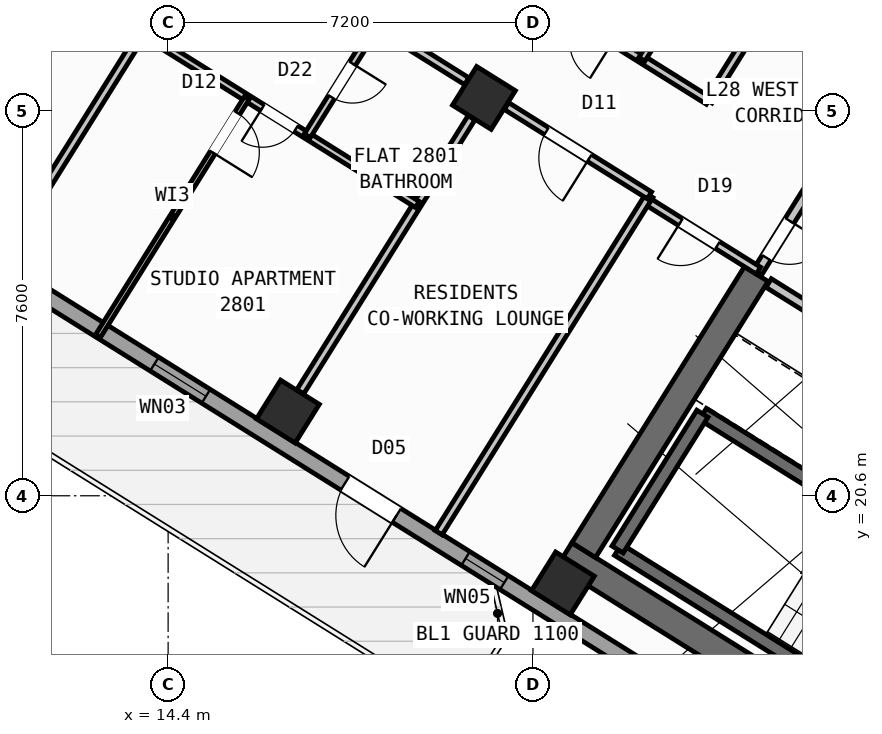
"""IFC4 building model, lengths in metres.
Left out: names, types, materials, properties, quantities, classifications, styles, units other than length and angle.
Written with IfcOpenShell. Run it as: python <this file> out.ifc"""

import sys

from ifc_helpers import new_model, si_unit, direction, frame, frame_2d, origin, origin_2d, place, context, subcontext, project, spatial, rectangle, hollow_rectangle, extrude, source, transform, mapped, element, fill, save


model = new_model("IFC4")
c1 = context("Model", 3, precision=1e-05, world=origin(), true_north=direction((0.0, 1.0)))
c2 = subcontext(c1, "Body", "Model", "MODEL_VIEW")
j1 = project(units=[si_unit("LENGTHUNIT", "METRE"), si_unit("PLANEANGLEUNIT", "RADIAN")], contexts=[c1])
p1 = place(None, origin())
s1 = spatial("IfcSite", under=j1, at=p1, CompositionType="ELEMENT")
p2 = place(p1, origin())
s2 = spatial("IfcBuilding", under=s1, at=p2, CompositionType="ELEMENT")
p3 = place(p2, frame((0.0, 0.0, 112.5)))
s3 = spatial("IfcBuildingStorey", under=s2, at=p3, CompositionType="ELEMENT", Elevation=112.5)
p4 = place(p3, frame((33.366, 12.477, 0.0), z_axis=(0.0, 0.0, 1.0), x_axis=(-0.848047359947, 0.529920442413, 0.0)))
e1 = element("IfcWall", 1, at=p4, inside=s3, PredefinedType="SHEAR", context=c2, shape_type="SweptSolid", body=[
    extrude(rectangle(XDim=13.14, YDim=0.55, at=frame_2d((6.57, 0.0))), origin(), (0.0, 0.0, 1.0), 3.35),
])
p5 = place(p3, frame((26.007, 24.976, 0.0), z_axis=(0.0, 0.0, 1.0), x_axis=(-0.529923795287, -0.848045264823, 0.0)))
e2 = element("IfcWall", 2, at=p5, inside=s3, PredefinedType="SHEAR", context=c2, shape_type="SweptSolid", body=[
    extrude(rectangle(XDim=6.425, YDim=0.55, at=frame_2d((3.212, 0.0))), origin(), (0.0, 0.0, 1.0), 3.35),
])
m1 = source(origin(), c2, "Body", "SweptSolid", [
    extrude(hollow_rectangle(XDim=0.9, YDim=0.9, WallThickness=0.036, at=origin_2d()), origin(), (0.0, 0.0, 1.0), 3.6),
])
for number, where, z_axis, x_axis in (
    (3, (22.191, 18.87, 0.0), (0.0, 0.0, 1.0), (-0.848, 0.53, 0.0)),
    (4, (20.632, 28.452, 0.0), (0.0, 0.0, 1.0), (-0.848, 0.53, 0.0)),
    (5, (16.764, 22.261, 0.0), (0.0, 0.0, 1.0), (-0.848, 0.53, 0.0)),
):
    element("IfcColumn", number, at=place(p3, frame(where, z_axis=z_axis, x_axis=x_axis)), inside=s3, PredefinedType="COLUMN", context=c2, shape_type="MappedRepresentation", body=[
        mapped(m1, transform((0.0, 0.0, 0.0), scale=1.0)),
    ])
p6 = place(p3, frame((31.76, 12.183, 0.0), z_axis=(0.0, 0.0, 1.0), x_axis=(-0.848047074256, 0.529920899612, 0.0)))
e6 = element("IfcWall", 6, at=p6, inside=s3, PredefinedType="STANDARD", context=c2, shape_type="SweptSolid", body=[
    extrude(rectangle(XDim=30.652, YDim=0.32, at=frame_2d((15.326, 0.0))), origin(), (0.0, 0.0, 1.0), 3.35),
])
p7 = place(p6, frame((15.153, 0.0, 0.0)))
e7 = element("IfcOpeningElement", 7, at=p7, cuts=e6, PredefinedType="OPENING", context=c2, shape_type="SweptSolid", body=[
    extrude(rectangle(XDim=1.2, YDim=2.15, at=frame_2d((0.6, 1.075))), frame((0.0, 0.17, 0.0), z_axis=(0.0, -1.0, 0.0), x_axis=(1.0, 0.0, 0.0)), (0.0, 0.0, 1.0), 0.34),
])
p8 = place(p6, frame((2.002, 0.0, 0.8)))
e8 = element("IfcOpeningElement", 8, at=p8, cuts=e6, PredefinedType="OPENING", context=c2, shape_type="SweptSolid", body=[
    extrude(rectangle(XDim=2.1, YDim=1.55, at=frame_2d((1.05, 0.775))), frame((0.0, 0.17, 0.0), z_axis=(0.0, -1.0, 0.0), x_axis=(1.0, 0.0, 0.0)), (0.0, 0.0, 1.0), 0.34),
])
p9 = place(p6, frame((7.206, 0.0, 0.8)))
e9 = element("IfcOpeningElement", 9, at=p9, cuts=e6, PredefinedType="OPENING", context=c2, shape_type="SweptSolid", body=[
    extrude(rectangle(XDim=2.1, YDim=1.55, at=frame_2d((1.05, 0.775))), frame((0.0, 0.17, 0.0), z_axis=(0.0, -1.0, 0.0), x_axis=(1.0, 0.0, 0.0)), (0.0, 0.0, 1.0), 0.34),
])
p10 = place(p6, frame((12.648, 0.0, 1.0)))
e10 = element("IfcOpeningElement", 10, at=p10, cuts=e6, PredefinedType="OPENING", context=c2, shape_type="SweptSolid", body=[
    extrude(rectangle(XDim=0.9, YDim=1.25, at=frame_2d((0.45, 0.625))), frame((0.0, 0.17, 0.0), z_axis=(0.0, -1.0, 0.0), x_axis=(1.0, 0.0, 0.0)), (0.0, 0.0, 1.0), 0.34),
])
p11 = place(p6, frame((19.59, 0.0, 0.95)))
e11 = element("IfcOpeningElement", 11, at=p11, cuts=e6, PredefinedType="OPENING", context=c2, shape_type="SweptSolid", body=[
    extrude(rectangle(XDim=1.2, YDim=1.4, at=frame_2d((0.6, 0.7))), frame((0.0, 0.17, 0.0), z_axis=(0.0, -1.0, 0.0), x_axis=(1.0, 0.0, 0.0)), (0.0, 0.0, 1.0), 0.34),
])
p12 = place(p6, frame((25.966, 0.0, 1.0)))
e12 = element("IfcOpeningElement", 12, at=p12, cuts=e6, PredefinedType="OPENING", context=c2, shape_type="SweptSolid", body=[
    extrude(rectangle(XDim=0.9, YDim=1.25, at=frame_2d((0.45, 0.625))), frame((0.0, 0.17, 0.0), z_axis=(0.0, -1.0, 0.0), x_axis=(1.0, 0.0, 0.0)), (0.0, 0.0, 1.0), 0.34),
])
p13 = place(p6, frame((28.871, 0.0, 1.0)))
e13 = element("IfcOpeningElement", 13, at=p13, cuts=e6, PredefinedType="OPENING", context=c2, shape_type="SweptSolid", body=[
    extrude(rectangle(XDim=0.9, YDim=1.25, at=frame_2d((0.45, 0.625))), frame((0.0, 0.17, 0.0), z_axis=(0.0, -1.0, 0.0), x_axis=(1.0, 0.0, 0.0)), (0.0, 0.0, 1.0), 0.34),
])
p14 = place(p3, frame((5.7, 28.71, 0.0), z_axis=(0.0, 0.0, 1.0), x_axis=(0.529923711467, 0.8480453172, 0.0)))
e14 = element("IfcWall", 14, at=p14, inside=s3, PredefinedType="STANDARD", context=c2, shape_type="SweptSolid", body=[
    extrude(rectangle(XDim=21.587, YDim=0.32, at=frame_2d((10.794, 0.0))), origin(), (0.0, 0.0, 1.0), 2.775),
])
p15 = place(p14, frame((1.984, 0.0, 0.8)))
e15 = element("IfcOpeningElement", 15, at=p15, cuts=e14, PredefinedType="OPENING", context=c2, shape_type="SweptSolid", body=[
    extrude(rectangle(XDim=2.1, YDim=1.55, at=frame_2d((1.05, 0.775))), frame((0.0, 0.17, 0.0), z_axis=(0.0, -1.0, 0.0), x_axis=(1.0, 0.0, 0.0)), (0.0, 0.0, 1.0), 0.34),
])
p16 = place(p14, frame((11.459, 0.0, 0.85)))
e16 = element("IfcOpeningElement", 16, at=p16, cuts=e14, PredefinedType="OPENING", context=c2, shape_type="SweptSolid", body=[
    extrude(rectangle(XDim=1.8, YDim=1.5, at=frame_2d((0.9, 0.75))), frame((0.0, 0.17, 0.0), z_axis=(0.0, -1.0, 0.0), x_axis=(1.0, 0.0, 0.0)), (0.0, 0.0, 1.0), 0.34),
])
p17 = place(p14, frame((18.335, 0.0, 0.85)))
e17 = element("IfcOpeningElement", 17, at=p17, cuts=e14, PredefinedType="OPENING", context=c2, shape_type="SweptSolid", body=[
    extrude(rectangle(XDim=1.5, YDim=1.5, at=frame_2d((0.75, 0.75))), frame((0.0, 0.17, 0.0), z_axis=(0.0, -1.0, 0.0), x_axis=(1.0, 0.0, 0.0)), (0.0, 0.0, 1.0), 0.34),
])
p18 = place(p3, frame((29.605, 15.581, 0.0), z_axis=(0.0, 0.0, 1.0), x_axis=(-0.848036911448, 0.529937163087, 0.0)))
e18 = element("IfcWall", 18, at=p18, inside=s3, PredefinedType="SHEAR", context=c2, shape_type="SweptSolid", body=[
    extrude(rectangle(XDim=7.46, YDim=0.26, at=frame_2d((3.73, 0.0))), origin(), (0.0, 0.0, 1.0), 3.35),
])
p19 = place(p3, frame((31.28, 18.261, 0.0), z_axis=(0.0, 0.0, 1.0), x_axis=(-0.848051618787, 0.529913626805, 0.0)))
e19 = element("IfcWall", 19, at=p19, inside=s3, PredefinedType="SHEAR", context=c2, shape_type="SweptSolid", body=[
    extrude(rectangle(XDim=7.46, YDim=0.26, at=frame_2d((3.73, 0.0))), origin(), (0.0, 0.0, 1.0), 3.35),
])
p20 = place(p19, frame((0.36, 0.0, 0.0)))
e20 = element("IfcOpeningElement", 20, at=p20, cuts=e19, PredefinedType="OPENING", context=c2, shape_type="SweptSolid", body=[
    extrude(rectangle(XDim=0.86, YDim=2.05, at=frame_2d((0.43, 1.025))), frame((0.0, 0.14, 0.0), z_axis=(0.0, -1.0, 0.0), x_axis=(1.0, 0.0, 0.0)), (0.0, 0.0, 1.0), 0.28),
])
p21 = place(p3, frame((24.945, 22.22, 0.0), z_axis=(0.0, 0.0, 1.0), x_axis=(-0.529908658664, -0.84805472316, 0.0)))
e21 = element("IfcWall", 21, at=p21, inside=s3, PredefinedType="SHEAR", context=c2, shape_type="SweptSolid", body=[
    extrude(rectangle(XDim=3.16, YDim=0.26, at=frame_2d((1.58, 0.0))), origin(), (0.0, 0.0, 1.0), 3.35),
])
p22 = place(p3, frame((31.525, 21.504, 0.0), z_axis=(0.0, 0.0, 1.0), x_axis=(-0.848040211232, 0.529931882541, 0.0)))
e22 = element("IfcWall", 22, at=p22, inside=s3, PredefinedType="STANDARD", context=c2, shape_type="SweptSolid", body=[
    extrude(rectangle(XDim=6.218, YDim=0.2, at=frame_2d((3.109, 0.0))), origin(), (0.0, 0.0, 1.0), 3.34),
])
p23 = place(p22, frame((4.4, 0.0, 0.0)))
e23 = element("IfcOpeningElement", 23, at=p23, cuts=e22, PredefinedType="OPENING", context=c2, shape_type="SweptSolid", body=[
    extrude(rectangle(XDim=0.86, YDim=2.05, at=frame_2d((0.43, 1.025))), frame((0.0, 0.11, 0.0), z_axis=(0.0, -1.0, 0.0), x_axis=(1.0, 0.0, 0.0)), (0.0, 0.0, 1.0), 0.22),
])
p24 = place(p22, frame((0.35, 0.0, 0.0)))
e24 = element("IfcOpeningElement", 24, at=p24, cuts=e22, PredefinedType="OPENING", context=c2, shape_type="SweptSolid", body=[
    extrude(rectangle(XDim=0.86, YDim=2.05, at=frame_2d((0.43, 1.025))), frame((0.0, 0.11, 0.0), z_axis=(0.0, -1.0, 0.0), x_axis=(1.0, 0.0, 0.0)), (0.0, 0.0, 1.0), 0.22),
])
p25 = place(p3, frame((27.596, 27.52, 0.0), z_axis=(0.0, 0.0, 1.0), x_axis=(-0.529865479138, -0.848081702443, 0.0)))
e25 = element("IfcWall", 25, at=p25, inside=s3, PredefinedType="STANDARD", context=c2, shape_type="SweptSolid", body=[
    extrude(rectangle(XDim=2.96, YDim=0.2, at=frame_2d((1.48, 0.0))), origin(), (0.0, 0.0, 1.0), 3.34),
])
p26 = place(p25, frame((1.76, 0.0, 0.0)))
e26 = element("IfcOpeningElement", 26, at=p26, cuts=e25, PredefinedType="OPENING", context=c2, shape_type="SweptSolid", body=[
    extrude(rectangle(XDim=0.86, YDim=2.05, at=frame_2d((0.43, 1.025))), frame((0.0, 0.11, 0.0), z_axis=(0.0, -1.0, 0.0), x_axis=(1.0, 0.0, 0.0)), (0.0, 0.0, 1.0), 0.22),
])
p27 = place(p3, frame((26.049, 25.044, 0.0), z_axis=(0.0, 0.0, 1.0), x_axis=(-0.848050851465, 0.529914854792, 0.0)))
e27 = element("IfcWall", 27, at=p27, inside=s3, PredefinedType="PARTITIONING", context=c2, shape_type="SweptSolid", body=[
    extrude(rectangle(XDim=2.61, YDim=0.16, at=frame_2d((1.305, 0.0))), origin(), (0.0, 0.0, 1.0), 2.775),
])
p28 = place(p27, frame((0.95, 0.0, 0.0)))
e28 = element("IfcOpeningElement", 28, at=p28, cuts=e27, PredefinedType="OPENING", context=c2, shape_type="SweptSolid", body=[
    extrude(rectangle(XDim=0.86, YDim=2.05, at=frame_2d((0.43, 1.025))), frame((0.0, 0.09, 0.0), z_axis=(0.0, -1.0, 0.0), x_axis=(1.0, 0.0, 0.0)), (0.0, 0.0, 1.0), 0.18),
])
p29 = place(p3, frame((31.239, 38.274, 0.0), z_axis=(0.0, 0.0, 1.0), x_axis=(-0.529925472745, -0.848044216616, 0.0)))
e29 = element("IfcWall", 29, at=p29, inside=s3, PredefinedType="PARTITIONING", context=c2, shape_type="SweptSolid", body=[
    extrude(rectangle(XDim=11.65, YDim=0.16, at=frame_2d((5.825, 0.0))), origin(), (0.0, 0.0, 1.0), 3.34),
])
p30 = place(p3, frame((23.899, 26.529, 0.0), z_axis=(0.0, 0.0, 1.0), x_axis=(-0.529920662441, -0.848047222457, 0.0)))
e30 = element("IfcWall", 30, at=p30, inside=s3, PredefinedType="PARTITIONING", context=c2, shape_type="SweptSolid", body=[
    extrude(rectangle(XDim=7.85, YDim=0.16, at=frame_2d((3.925, 0.0))), origin(), (0.0, 0.0, 1.0), 3.34),
])
p31 = place(p3, frame((25.065, 28.394, 0.0), z_axis=(0.0, 0.0, 1.0), x_axis=(-0.848048310262, 0.529918921593, 0.0)))
e31 = element("IfcWall", 31, at=p31, inside=s3, PredefinedType="PARTITIONING", context=c2, shape_type="SweptSolid", body=[
    extrude(rectangle(XDim=16.73, YDim=0.16, at=frame_2d((8.365, 0.0))), origin(), (0.0, 0.0, 1.0), 3.34),
])
p32 = place(p31, frame((2.22, 0.0, 0.0)))
e32 = element("IfcOpeningElement", 32, at=p32, cuts=e31, PredefinedType="OPENING", context=c2, shape_type="SweptSolid", body=[
    extrude(rectangle(XDim=0.86, YDim=2.05, at=frame_2d((0.43, 1.025))), frame((0.0, 0.09, 0.0), z_axis=(0.0, -1.0, 0.0), x_axis=(1.0, 0.0, 0.0)), (0.0, 0.0, 1.0), 0.18),
])
p33 = place(p31, frame((7.82, 0.0, 0.0)))
e33 = element("IfcOpeningElement", 33, at=p33, cuts=e31, PredefinedType="OPENING", context=c2, shape_type="SweptSolid", body=[
    extrude(rectangle(XDim=1.0, YDim=2.1, at=frame_2d((0.5, 1.05))), frame((0.0, 0.09, 0.0), z_axis=(0.0, -1.0, 0.0), x_axis=(1.0, 0.0, 0.0)), (0.0, 0.0, 1.0), 0.18),
])
p34 = place(p31, frame((12.95, 0.0, 0.0)))
e34 = element("IfcOpeningElement", 34, at=p34, cuts=e31, PredefinedType="OPENING", context=c2, shape_type="SweptSolid", body=[
    extrude(rectangle(XDim=1.0, YDim=2.1, at=frame_2d((0.5, 1.05))), frame((0.0, 0.09, 0.0), z_axis=(0.0, -1.0, 0.0), x_axis=(1.0, 0.0, 0.0)), (0.0, 0.0, 1.0), 0.18),
])
p35 = place(p3, frame((23.899, 26.529, 0.0), z_axis=(0.0, 0.0, 1.0), x_axis=(-0.848064240775, 0.529893426567, 0.0)))
e35 = element("IfcWall", 35, at=p35, inside=s3, PredefinedType="PARTITIONING", context=c2, shape_type="SweptSolid", body=[
    extrude(rectangle(XDim=3.328, YDim=0.16, at=frame_2d((1.664, 0.0))), origin(), (0.0, 0.0, 1.0), 2.775),
])
p36 = place(p35, frame((1.395, 0.0, 0.0)))
e36 = element("IfcOpeningElement", 36, at=p36, cuts=e35, PredefinedType="OPENING", context=c2, shape_type="SweptSolid", body=[
    extrude(rectangle(XDim=1.0, YDim=2.1, at=frame_2d((0.5, 1.05))), frame((0.0, 0.09, 0.0), z_axis=(0.0, -1.0, 0.0), x_axis=(1.0, 0.0, 0.0)), (0.0, 0.0, 1.0), 0.18),
])
p37 = place(p3, frame((20.293, 28.782, 0.0), z_axis=(0.0, 0.0, 1.0), x_axis=(-0.848040881926, 0.529930809241, 0.0)))
e37 = element("IfcWall", 37, at=p37, inside=s3, PredefinedType="PARTITIONING", context=c2, shape_type="SweptSolid", body=[
    extrude(rectangle(XDim=5.476, YDim=0.16, at=frame_2d((2.738, 0.0))), origin(), (0.0, 0.0, 1.0), 2.775),
])
p38 = place(p37, frame((3.568, 0.0, 0.0)))
e38 = element("IfcOpeningElement", 38, at=p38, cuts=e37, PredefinedType="OPENING", context=c2, shape_type="SweptSolid", body=[
    extrude(rectangle(XDim=1.0, YDim=2.1, at=frame_2d((0.5, 1.05))), frame((0.0, 0.09, 0.0), z_axis=(0.0, -1.0, 0.0), x_axis=(1.0, 0.0, 0.0)), (0.0, 0.0, 1.0), 0.18),
])
for number, where, z_axis, x_axis in (
    (39, (20.387, 28.06, 0.0), (0.0, 0.0, 1.0), (-0.53, -0.848, 0.0)),
    (40, (14.96, 31.452, 0.0), (0.0, 0.0, 1.0), (-0.53, -0.848, 0.0)),
):
    element("IfcWall", number, at=place(p3, frame(where, z_axis=z_axis, x_axis=x_axis)), inside=s3, PredefinedType="PARTITIONING", context=c2, shape_type="SweptSolid", body=[
        extrude(rectangle(XDim=6.376, YDim=0.16, at=frame_2d((3.188, 0.0))), origin(), (0.0, 0.0, 1.0), 2.775),
    ])
p39 = place(p3, frame((19.318, 26.349, 0.0), z_axis=(0.0, 0.0, 1.0), x_axis=(-0.848039019877, 0.529933789039, 0.0)))
e41 = element("IfcWall", 41, at=p39, inside=s3, PredefinedType="PLUMBINGWALL", context=c2, shape_type="SweptSolid", body=[
    extrude(rectangle(XDim=6.4, YDim=0.14, at=frame_2d((3.2, 0.0))), origin(), (0.0, 0.0, 1.0), 3.34),
])
p40 = place(p39, frame((2.824, 0.0, 0.0)))
e42 = element("IfcOpeningElement", 42, at=p40, cuts=e41, PredefinedType="OPENING", context=c2, shape_type="SweptSolid", body=[
    extrude(rectangle(XDim=0.78, YDim=2.05, at=frame_2d((0.39, 1.025))), frame((0.0, 0.08, 0.0), z_axis=(0.0, -1.0, 0.0), x_axis=(1.0, 0.0, 0.0)), (0.0, 0.0, 1.0), 0.16),
])
p41 = place(p3, frame((18.514, 29.894, 0.0), z_axis=(0.0, 0.0, 1.0), x_axis=(-0.529913878929, -0.848051461244, 0.0)))
e43 = element("IfcWall", 43, at=p41, inside=s3, PredefinedType="PLUMBINGWALL", context=c2, shape_type="SweptSolid", body=[
    extrude(rectangle(XDim=2.58, YDim=0.14, at=frame_2d((1.29, 0.0))), origin(), (0.0, 0.0, 1.0), 3.34),
])
p42 = place(p41, frame((0.9, 0.0, 0.0)))
e44 = element("IfcOpeningElement", 44, at=p42, cuts=e43, PredefinedType="OPENING", context=c2, shape_type="SweptSolid", body=[
    extrude(rectangle(XDim=0.78, YDim=2.05, at=frame_2d((0.39, 1.025))), frame((0.0, 0.08, 0.0), z_axis=(0.0, -1.0, 0.0), x_axis=(1.0, 0.0, 0.0)), (0.0, 0.0, 1.0), 0.16),
])
p43 = place(p3, frame((15.953, 28.452, 0.0), z_axis=(0.0, 0.0, 1.0), x_axis=(-0.529919714018, -0.848047815099, 0.0)))
e45 = element("IfcWall", 45, at=p43, inside=s3, PredefinedType="PARTITIONING", context=c2, shape_type="SweptSolid", body=[
    extrude(rectangle(XDim=5.54, YDim=0.11, at=frame_2d((2.77, 0.0))), origin(), (0.0, 0.0, 1.0), 3.34),
])
p44 = place(p43, frame((0.35, 0.0, 0.0)))
e46 = element("IfcOpeningElement", 46, at=p44, cuts=e45, PredefinedType="OPENING", context=c2, shape_type="SweptSolid", body=[
    extrude(rectangle(XDim=0.92, YDim=2.08, at=frame_2d((0.46, 1.04))), frame((0.0, 0.065, 0.0), z_axis=(0.0, -1.0, 0.0), x_axis=(1.0, 0.0, 0.0)), (0.0, 0.0, 1.0), 0.13),
])
p45 = place(p3, frame((12.188, 33.847, 0.0), z_axis=(0.0, 0.0, 1.0), x_axis=(-0.529917860021, -0.848048973604, 0.0)))
e47 = element("IfcWall", 47, at=p45, inside=s3, PredefinedType="PARTITIONING", context=c2, shape_type="SweptSolid", body=[
    extrude(rectangle(XDim=8.12, YDim=0.11, at=frame_2d((4.06, 0.0))), origin(), (0.0, 0.0, 1.0), 3.34),
])
p46 = place(p45, frame((0.76, 0.0, 0.0)))
e48 = element("IfcOpeningElement", 48, at=p46, cuts=e47, PredefinedType="OPENING", context=c2, shape_type="SweptSolid", body=[
    extrude(rectangle(XDim=0.78, YDim=2.05, at=frame_2d((0.39, 1.025))), frame((0.0, 0.065, 0.0), z_axis=(0.0, -1.0, 0.0), x_axis=(1.0, 0.0, 0.0)), (0.0, 0.0, 1.0), 0.13),
])
p47 = place(p45, frame((4.8, 0.0, 0.0)))
e49 = element("IfcOpeningElement", 49, at=p47, cuts=e47, PredefinedType="OPENING", context=c2, shape_type="SweptSolid", body=[
    extrude(rectangle(XDim=0.92, YDim=2.08, at=frame_2d((0.46, 1.04))), frame((0.0, 0.065, 0.0), z_axis=(0.0, -1.0, 0.0), x_axis=(1.0, 0.0, 0.0)), (0.0, 0.0, 1.0), 0.13),
])
p48 = place(p3, frame((25.345, 31.768, 0.0), z_axis=(0.0, 0.0, 1.0), x_axis=(-0.529882284462, -0.848071202561, 0.0)))
e50 = element("IfcWall", 50, at=p48, inside=s3, PredefinedType="PLUMBINGWALL", context=c2, shape_type="SweptSolid", body=[
    extrude(rectangle(XDim=3.01, YDim=0.14, at=frame_2d((1.505, 0.0))), origin(), (0.0, 0.0, 1.0), 2.995),
])
p49 = place(p48, frame((1.115, 0.0, 0.0)))
e51 = element("IfcOpeningElement", 51, at=p49, cuts=e50, PredefinedType="OPENING", context=c2, shape_type="SweptSolid", body=[
    extrude(rectangle(XDim=0.78, YDim=2.05, at=frame_2d((0.39, 1.025))), frame((0.0, 0.08, 0.0), z_axis=(0.0, -1.0, 0.0), x_axis=(1.0, 0.0, 0.0)), (0.0, 0.0, 1.0), 0.16),
])
m2 = source(origin(), c2, "Body", "SweptSolid", [
    extrude(rectangle(XDim=1.2, YDim=2.15, at=frame_2d((0.6, 1.075))), frame((0.0, 0.025, 0.0), z_axis=(0.0, -1.0, 0.0), x_axis=(1.0, 0.0, 0.0)), (0.0, 0.0, 1.0), 0.05),
])
p50 = place(p7, origin())
e52 = element("IfcDoor", 52, at=p50, inside=s3, OperationType="SINGLE_SWING_LEFT", PredefinedType="DOOR", context=c2, shape_type="MappedRepresentation", body=[
    mapped(m2, transform((0.0, 0.0, 0.0), scale=1.0)),
])
fill(e7, e52)
m3 = source(origin(), c2, "Body", "SweptSolid", [
    extrude(rectangle(XDim=0.9, YDim=1.25, at=frame_2d((0.45, 0.625))), frame((0.0, 0.03, 0.0), z_axis=(0.0, -1.0, 0.0), x_axis=(1.0, 0.0, 0.0)), (0.0, 0.0, 1.0), 0.06),
])
p51 = place(p10, origin())
e53 = element("IfcWindow", 53, at=p51, inside=s3, PartitioningType="SINGLE_PANEL", PredefinedType="WINDOW", context=c2, shape_type="MappedRepresentation", body=[
    mapped(m3, transform((0.0, 0.0, 0.0), scale=1.0)),
])
fill(e10, e53)
m4 = source(origin(), c2, "Body", "SweptSolid", [
    extrude(rectangle(XDim=1.2, YDim=1.4, at=frame_2d((0.6, 0.7))), frame((0.0, 0.03, 0.0), z_axis=(0.0, -1.0, 0.0), x_axis=(1.0, 0.0, 0.0)), (0.0, 0.0, 1.0), 0.06),
])
p52 = place(p11, origin())
e54 = element("IfcWindow", 54, at=p52, inside=s3, PartitioningType="SINGLE_PANEL", PredefinedType="WINDOW", context=c2, shape_type="MappedRepresentation", body=[
    mapped(m4, transform((0.0, 0.0, 0.0), scale=1.0)),
])
fill(e11, e54)
m5 = source(origin(), c2, "Body", "SweptSolid", [
    extrude(rectangle(XDim=0.86, YDim=2.05, at=frame_2d((0.43, 1.025))), frame((0.0, 0.025, 0.0), z_axis=(0.0, -1.0, 0.0), x_axis=(1.0, 0.0, 0.0)), (0.0, 0.0, 1.0), 0.05),
])
p53 = place(p28, origin())
e55 = element("IfcDoor", 55, at=p53, inside=s3, OperationType="SINGLE_SWING_RIGHT", PredefinedType="DOOR", context=c2, shape_type="MappedRepresentation", body=[
    mapped(m5, transform((0.0, 0.0, 0.0), scale=1.0)),
])
fill(e28, e55)
p54 = place(p26, origin())
e56 = element("IfcDoor", 56, at=p54, inside=s3, OperationType="SINGLE_SWING_LEFT", PredefinedType="DOOR", context=c2, shape_type="MappedRepresentation", body=[
    mapped(m5, transform((0.0, 0.0, 0.0), scale=1.0)),
])
fill(e26, e56)
m6 = source(origin(), c2, "Body", "SweptSolid", [
    extrude(rectangle(XDim=1.0, YDim=2.1, at=frame_2d((0.5, 1.05))), frame((0.0, 0.025, 0.0), z_axis=(0.0, -1.0, 0.0), x_axis=(1.0, 0.0, 0.0)), (0.0, 0.0, 1.0), 0.05),
])
p55 = place(p36, origin())
e57 = element("IfcDoor", 57, at=p55, inside=s3, OperationType="SINGLE_SWING_LEFT", PredefinedType="DOOR", context=c2, shape_type="MappedRepresentation", body=[
    mapped(m6, transform((0.0, 0.0, 0.0), scale=1.0)),
])
fill(e36, e57)
m7 = source(origin(), c2, "Body", "SweptSolid", [
    extrude(rectangle(XDim=0.92, YDim=2.08, at=frame_2d((0.46, 1.04))), frame((0.0, 0.025, 0.0), z_axis=(0.0, -1.0, 0.0), x_axis=(1.0, 0.0, 0.0)), (0.0, 0.0, 1.0), 0.05),
])
p56 = place(p44, origin())
e58 = element("IfcDoor", 58, at=p56, inside=s3, OperationType="SINGLE_SWING_RIGHT", PredefinedType="DOOR", context=c2, shape_type="MappedRepresentation", body=[
    mapped(m7, transform((0.0, 0.0, 0.0), scale=1.0)),
])
fill(e46, e58)
m8 = source(origin(), c2, "Body", "SweptSolid", [
    extrude(rectangle(XDim=0.78, YDim=2.05, at=frame_2d((0.39, 1.025))), frame((0.0, 0.025, 0.0), z_axis=(0.0, -1.0, 0.0), x_axis=(1.0, 0.0, 0.0)), (0.0, 0.0, 1.0), 0.05),
])
p57 = place(p40, origin())
e59 = element("IfcDoor", 59, at=p57, inside=s3, OperationType="SINGLE_SWING_RIGHT", PredefinedType="DOOR", context=c2, shape_type="MappedRepresentation", body=[
    mapped(m8, transform((0.0, 0.0, 0.0), scale=1.0)),
])
fill(e42, e59)
p58 = place(p42, origin())
e60 = element("IfcDoor", 60, at=p58, inside=s3, OperationType="SINGLE_SWING_LEFT", PredefinedType="DOOR", context=c2, shape_type="MappedRepresentation", body=[
    mapped(m8, transform((0.0, 0.0, 0.0), scale=1.0)),
])
fill(e44, e60)
save(model, sys.argv[1])
